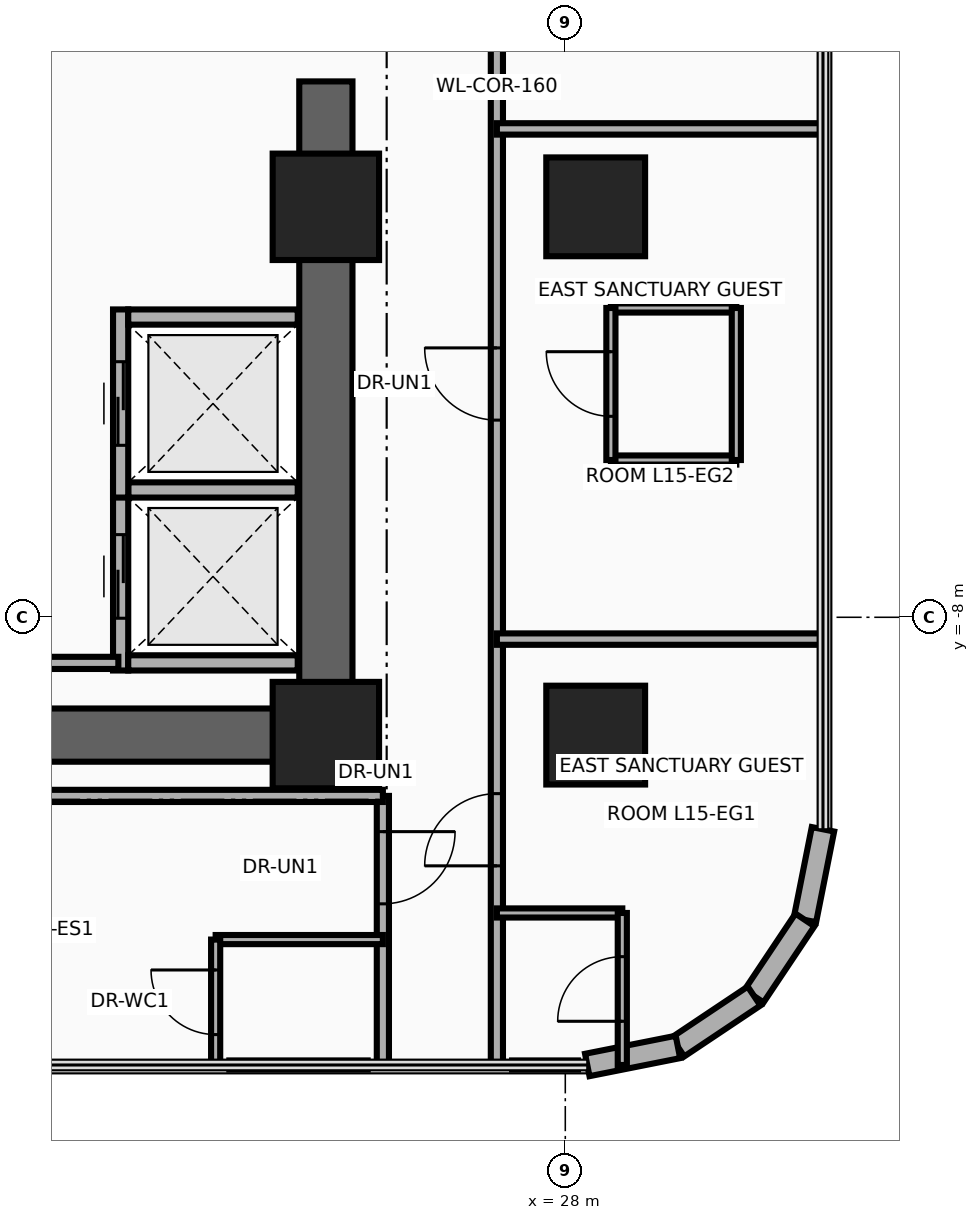
"""IFC4 building model, lengths in metres.
Left out: names, types, materials, properties, quantities, classifications, styles, units other than length and angle.
Written with IfcOpenShell. Run it as: python <this file> out.ifc"""

import sys

from ifc_helpers import new_model, si_unit, direction, frame, frame_2d, origin, origin_2d, place, context, subcontext, project, spatial, rectangle, circle, extrude, source, transform, mapped, element, fill, save


model = new_model("IFC4")
c1 = context("Model", 3, precision=1e-05, world=origin(), true_north=direction((0.0, 1.0)))
c2 = subcontext(c1, "Body", "Model", "MODEL_VIEW")
j1 = project(units=[si_unit("LENGTHUNIT", "METRE"), si_unit("PLANEANGLEUNIT", "RADIAN")], contexts=[c1])
p1 = place(None, origin())
s1 = spatial("IfcSite", under=j1, at=p1, CompositionType="ELEMENT")
p2 = place(p1, origin())
s2 = spatial("IfcBuilding", under=s1, at=p2, CompositionType="ELEMENT")
p3 = place(p2, frame((0.0, 0.0, 63.0)))
s3 = spatial("IfcBuildingStorey", under=s2, at=p3, CompositionType="ELEMENT", Elevation=63.0)
p4 = place(p3, frame((24.85, -9.9, 0.0), z_axis=(0.0, 0.0, 1.0), x_axis=(0.0, 1.0, 0.0)))
e1 = element("IfcWall", 1, at=p4, inside=s3, PredefinedType="SHEAR", context=c2, shape_type="SweptSolid", body=[
    extrude(rectangle(XDim=8.95, YDim=0.7, at=frame_2d((4.475, 0.0))), origin(), (0.0, 0.0, 1.0), 3.46),
])
p5 = place(p3, frame((15.85, -9.55, 0.0), z_axis=(0.0, 0.0, 1.0), x_axis=(1.0, 0.0, 0.0)))
e2 = element("IfcWall", 2, at=p5, inside=s3, PredefinedType="SHEAR", context=c2, shape_type="SweptSolid", body=[
    extrude(rectangle(XDim=9.0, YDim=0.7, at=frame_2d((4.5, 0.0))), origin(), (0.0, 0.0, 1.0), 3.46),
])
m1 = source(origin(), c2, "Body", "SweptSolid", [
    extrude(rectangle(XDim=1.4, YDim=1.4, at=origin_2d()), origin(), (0.0, 0.0, 1.0), 3.7),
])
p6 = place(p3, frame((24.85, -9.55, 0.0), z_axis=(0.0, 0.0, 1.0), x_axis=(1.0, 0.0, 0.0)))
e3 = element("IfcColumn", 3, at=p6, inside=s3, PredefinedType="COLUMN", context=c2, shape_type="MappedRepresentation", body=[
    mapped(m1, transform((0.0, 0.0, 0.0), x_axis=(1.0, 0.0, 0.0), y_axis=(0.0, 1.0, 0.0), z_axis=(0.0, 0.0, 1.0), scale=1.0)),
])
m2 = source(origin(), c2, "Body", "SweptSolid", [
    extrude(circle(Radius=0.65, at=origin_2d()), origin(), (0.0, 0.0, 1.0), 3.7),
])
p7 = place(p3, frame((28.4, -9.55, 0.0), z_axis=(0.0, 0.0, 1.0), x_axis=(1.0, 0.0, 0.0)))
e4 = element("IfcColumn", 4, at=p7, inside=s3, PredefinedType="COLUMN", context=c2, shape_type="MappedRepresentation", body=[
    mapped(m2, transform((0.0, 0.0, 0.0), x_axis=(1.0, 0.0, 0.0), y_axis=(0.0, 1.0, 0.0), z_axis=(0.0, 0.0, 1.0), scale=1.0)),
])
p8 = place(p3, frame((24.85, -2.6, 0.0), z_axis=(0.0, 0.0, 1.0), x_axis=(1.0, 0.0, 0.0)))
e5 = element("IfcColumn", 5, at=p8, inside=s3, PredefinedType="COLUMN", context=c2, shape_type="MappedRepresentation", body=[
    mapped(m1, transform((0.0, 0.0, 0.0), x_axis=(1.0, 0.0, 0.0), y_axis=(0.0, 1.0, 0.0), z_axis=(0.0, 0.0, 1.0), scale=1.0)),
])
p9 = place(p3, frame((28.4, -2.6, 0.0), z_axis=(0.0, 0.0, 1.0), x_axis=(1.0, 0.0, 0.0)))
e6 = element("IfcColumn", 6, at=p9, inside=s3, PredefinedType="COLUMN", context=c2, shape_type="MappedRepresentation", body=[
    mapped(m2, transform((0.0, 0.0, 0.0), x_axis=(1.0, 0.0, 0.0), y_axis=(0.0, 1.0, 0.0), z_axis=(0.0, 0.0, 1.0), scale=1.0)),
])
p10 = place(p3, frame((31.39, -10.789, 0.0), z_axis=(0.0, 0.0, 1.0), x_axis=(-0.194996050505, -0.980804027463, 0.0)))
e7 = element("IfcWall", 7, at=p10, inside=s3, PredefinedType="SOLIDWALL", context=c2, shape_type="SweptSolid", body=[
    extrude(rectangle(XDim=1.216, YDim=0.3, at=frame_2d((0.608, 0.0))), origin(), (0.0, 0.0, 1.0), 3.46),
])
for number, where, z_axis, x_axis in (
    (8, (31.153, -11.982, 0.0), (0.0, 0.0, 1.0), (-0.556, -0.831, 0.0)),
    (9, (30.483, -12.983, 0.0), (0.0, 0.0, 1.0), (-0.831, -0.556, 0.0)),
):
    element("IfcWall", number, at=place(p3, frame(where, z_axis=z_axis, x_axis=x_axis)), inside=s3, PredefinedType="SOLIDWALL", context=c2, shape_type="SweptSolid", body=[
        extrude(rectangle(XDim=1.205, YDim=0.3, at=frame_2d((0.603, 0.0))), origin(), (0.0, 0.0, 1.0), 3.46),
    ])
p11 = place(p3, frame((29.482, -13.653, 0.0), z_axis=(0.0, 0.0, 1.0), x_axis=(-0.980804027463, -0.194996050505, 0.0)))
e10 = element("IfcWall", 10, at=p11, inside=s3, PredefinedType="SOLIDWALL", context=c2, shape_type="SweptSolid", body=[
    extrude(rectangle(XDim=1.216, YDim=0.3, at=frame_2d((0.608, 0.0))), origin(), (0.0, 0.0, 1.0), 3.46),
])
p12 = place(p3, frame((22.15, -8.7, 0.0), z_axis=(0.0, 0.0, 1.0), x_axis=(0.0, 1.0, 0.0)))
e11 = element("IfcWall", 11, at=p12, inside=s3, PredefinedType="MOVABLE", context=c2, shape_type="SweptSolid", body=[
    extrude(rectangle(XDim=2.475, YDim=0.2, at=frame_2d((1.237, 0.0))), origin(), (0.0, 0.0, 1.0), 3.46),
])
p13 = place(p12, frame((0.688, 0.0, 0.0)))
e12 = element("IfcOpeningElement", 12, at=p13, cuts=e11, PredefinedType="OPENING", context=c2, shape_type="SweptSolid", body=[
    extrude(rectangle(XDim=1.1, YDim=2.1, at=frame_2d((0.55, 1.05))), frame((0.0, 0.115, 0.0), z_axis=(0.0, -1.0, 0.0), x_axis=(1.0, 0.0, 0.0)), (0.0, 0.0, 1.0), 0.23),
])
for number, where, z_axis, x_axis in (
    (13, (22.25, -8.6, 0.0), (0.0, 0.0, 1.0), (1.0, 0.0, 0.0)),
    (14, (22.25, -6.325, 0.0), (0.0, 0.0, 1.0), (1.0, 0.0, 0.0)),
):
    element("IfcWall", number, at=place(p3, frame(where, z_axis=z_axis, x_axis=x_axis)), inside=s3, PredefinedType="MOVABLE", context=c2, shape_type="SweptSolid", body=[
        extrude(rectangle(XDim=2.23, YDim=0.2, at=frame_2d((1.115, 0.0))), origin(), (0.0, 0.0, 1.0), 3.46),
    ])
p14 = place(p3, frame((22.15, -6.425, 0.0), z_axis=(0.0, 0.0, 1.0), x_axis=(0.0, 1.0, 0.0)))
e15 = element("IfcWall", 15, at=p14, inside=s3, PredefinedType="MOVABLE", context=c2, shape_type="SweptSolid", body=[
    extrude(rectangle(XDim=2.475, YDim=0.2, at=frame_2d((1.238, 0.0))), origin(), (0.0, 0.0, 1.0), 3.46),
])
p15 = place(p14, frame((0.688, 0.0, 0.0)))
e16 = element("IfcOpeningElement", 16, at=p15, cuts=e15, PredefinedType="OPENING", context=c2, shape_type="SweptSolid", body=[
    extrude(rectangle(XDim=1.1, YDim=2.1, at=frame_2d((0.55, 1.05))), frame((0.0, 0.115, 0.0), z_axis=(0.0, -1.0, 0.0), x_axis=(1.0, 0.0, 0.0)), (0.0, 0.0, 1.0), 0.23),
])
p16 = place(p3, frame((22.25, -4.05, 0.0), z_axis=(0.0, 0.0, 1.0), x_axis=(1.0, 0.0, 0.0)))
e17 = element("IfcWall", 17, at=p16, inside=s3, PredefinedType="MOVABLE", context=c2, shape_type="SweptSolid", body=[
    extrude(rectangle(XDim=2.23, YDim=0.2, at=frame_2d((1.115, 0.0))), origin(), (0.0, 0.0, 1.0), 3.46),
])
p17 = place(p3, frame((20.3, -8.6, 0.0), z_axis=(0.0, 0.0, 1.0), x_axis=(1.0, 0.0, 0.0)))
e18 = element("IfcWall", 18, at=p17, inside=s3, PredefinedType="PARTITIONING", context=c2, shape_type="SweptSolid", body=[
    extrude(rectangle(XDim=1.82, YDim=0.16, at=frame_2d((0.91, 0.0))), origin(), (0.0, 0.0, 1.0), 3.46),
])
p18 = place(p3, frame((25.6, -13.89, 0.0), z_axis=(0.0, 0.0, 1.0), x_axis=(0.0, 1.0, 0.0)))
e19 = element("IfcWall", 19, at=p18, inside=s3, PredefinedType="PARTITIONING", context=c2, shape_type="SweptSolid", body=[
    extrude(rectangle(XDim=3.54, YDim=0.16, at=frame_2d((1.77, 0.0))), origin(), (0.0, 0.0, 1.0), 3.46),
])
p19 = place(p18, frame((2.12, 0.0, 0.0)))
e20 = element("IfcOpeningElement", 20, at=p19, cuts=e19, PredefinedType="OPENING", context=c2, shape_type="SweptSolid", body=[
    extrude(rectangle(XDim=0.95, YDim=2.15, at=frame_2d((0.475, 1.075))), frame((0.0, 0.095, 0.0), z_axis=(0.0, -1.0, 0.0), x_axis=(1.0, 0.0, 0.0)), (0.0, 0.0, 1.0), 0.19),
])
p20 = place(p3, frame((13.41, -10.35, 0.0), z_axis=(0.0, 0.0, 1.0), x_axis=(1.0, 0.0, 0.0)))
e21 = element("IfcWall", 21, at=p20, inside=s3, PredefinedType="PARTITIONING", context=c2, shape_type="SweptSolid", body=[
    extrude(rectangle(XDim=12.19, YDim=0.16, at=frame_2d((6.095, 0.0))), origin(), (0.0, 0.0, 1.0), 3.46),
])
p21 = place(p3, frame((23.4, -12.24, 0.0), z_axis=(0.0, 0.0, 1.0), x_axis=(1.0, 0.0, 0.0)))
e22 = element("IfcWall", 22, at=p21, inside=s3, PredefinedType="PARTITIONING", context=c2, shape_type="SweptSolid", body=[
    extrude(rectangle(XDim=2.2, YDim=0.12, at=frame_2d((1.1, 0.0))), origin(), (0.0, 0.0, 1.0), 3.46),
])
p22 = place(p3, frame((23.4, -13.89, 0.0), z_axis=(0.0, 0.0, 1.0), x_axis=(0.0, 1.0, 0.0)))
e23 = element("IfcWall", 23, at=p22, inside=s3, PredefinedType="PARTITIONING", context=c2, shape_type="SweptSolid", body=[
    extrude(rectangle(XDim=1.65, YDim=0.12, at=frame_2d((0.825, 0.0))), origin(), (0.0, 0.0, 1.0), 3.46),
])
p23 = place(p22, frame((0.4, 0.0, 0.0)))
e24 = element("IfcOpeningElement", 24, at=p23, cuts=e23, PredefinedType="OPENING", context=c2, shape_type="SweptSolid", body=[
    extrude(rectangle(XDim=0.85, YDim=2.1, at=frame_2d((0.425, 1.05))), frame((0.0, 0.075, 0.0), z_axis=(0.0, -1.0, 0.0), x_axis=(1.0, 0.0, 0.0)), (0.0, 0.0, 1.0), 0.15),
])
p24 = place(p3, frame((23.58, -13.89, 0.0), z_axis=(0.0, 0.0, 1.0), x_axis=(1.0, 0.0, 0.0)))
e25 = element("IfcWall", 25, at=p24, inside=s3, PredefinedType="PARTITIONING", context=c2, shape_type="SweptSolid", body=[
    extrude(rectangle(XDim=1.82, YDim=0.12, at=frame_2d((0.91, 0.0))), origin(), (0.0, 0.0, 1.0), 3.46),
])
p25 = place(p3, frame((27.1, -13.89, 0.0), z_axis=(0.0, 0.0, 1.0), x_axis=(0.0, 1.0, 0.0)))
e26 = element("IfcWall", 26, at=p25, inside=s3, PredefinedType="PARTITIONING", context=c2, shape_type="SweptSolid", body=[
    extrude(rectangle(XDim=25.74, YDim=0.16, at=frame_2d((12.87, 0.0))), origin(), (0.0, 0.0, 1.0), 2.583),
])
p26 = place(p25, frame((2.62, 0.0, 0.0)))
e27 = element("IfcOpeningElement", 27, at=p26, cuts=e26, PredefinedType="OPENING", context=c2, shape_type="SweptSolid", body=[
    extrude(rectangle(XDim=0.95, YDim=2.15, at=frame_2d((0.475, 1.075))), frame((0.0, 0.095, 0.0), z_axis=(0.0, -1.0, 0.0), x_axis=(1.0, 0.0, 0.0)), (0.0, 0.0, 1.0), 0.19),
])
p27 = place(p25, frame((8.484, 0.0, 0.0)))
e28 = element("IfcOpeningElement", 28, at=p27, cuts=e26, PredefinedType="OPENING", context=c2, shape_type="SweptSolid", body=[
    extrude(rectangle(XDim=0.95, YDim=2.15, at=frame_2d((0.475, 1.075))), frame((0.0, 0.095, 0.0), z_axis=(0.0, -1.0, 0.0), x_axis=(1.0, 0.0, 0.0)), (0.0, 0.0, 1.0), 0.19),
])
p28 = place(p25, frame((14.197, 0.0, 0.0)))
e29 = element("IfcOpeningElement", 29, at=p28, cuts=e26, PredefinedType="OPENING", context=c2, shape_type="SweptSolid", body=[
    extrude(rectangle(XDim=0.95, YDim=2.15, at=frame_2d((0.475, 1.075))), frame((0.0, 0.095, 0.0), z_axis=(0.0, -1.0, 0.0), x_axis=(1.0, 0.0, 0.0)), (0.0, 0.0, 1.0), 0.19),
])
p29 = place(p25, frame((21.648, 0.0, 0.0)))
e30 = element("IfcOpeningElement", 30, at=p29, cuts=e26, PredefinedType="OPENING", context=c2, shape_type="SweptSolid", body=[
    extrude(rectangle(XDim=0.95, YDim=2.15, at=frame_2d((0.475, 1.075))), frame((0.0, 0.095, 0.0), z_axis=(0.0, -1.0, 0.0), x_axis=(1.0, 0.0, 0.0)), (0.0, 0.0, 1.0), 0.19),
])
for number, where, z_axis, x_axis in (
    (31, (27.1, -8.287, 0.0), (0.0, 0.0, 1.0), (1.0, 0.0, 0.0)),
    (32, (27.1, -1.575, 0.0), (0.0, 0.0, 1.0), (1.0, 0.0, 0.0)),
):
    element("IfcWall", number, at=place(p3, frame(where, z_axis=z_axis, x_axis=x_axis)), inside=s3, PredefinedType="PARTITIONING", context=c2, shape_type="SweptSolid", body=[
        extrude(rectangle(XDim=4.29, YDim=0.15, at=frame_2d((2.145, 0.0))), origin(), (0.0, 0.0, 1.0), 2.896),
    ])
p30 = place(p3, frame((27.1, -11.89, 0.0), z_axis=(0.0, 0.0, 1.0), x_axis=(1.0, 0.0, 0.0)))
e33 = element("IfcWall", 33, at=p30, inside=s3, PredefinedType="PARTITIONING", context=c2, shape_type="SweptSolid", body=[
    extrude(rectangle(XDim=1.65, YDim=0.12, at=frame_2d((0.825, 0.0))), origin(), (0.0, 0.0, 1.0), 3.46),
])
p31 = place(p3, frame((28.75, -13.89, 0.0), z_axis=(0.0, 0.0, 1.0), x_axis=(0.0, 1.0, 0.0)))
e34 = element("IfcWall", 34, at=p31, inside=s3, PredefinedType="PARTITIONING", context=c2, shape_type="SweptSolid", body=[
    extrude(rectangle(XDim=2.0, YDim=0.12, at=frame_2d((1.0, 0.0))), origin(), (0.0, 0.0, 1.0), 3.46),
])
p32 = place(p31, frame((0.575, 0.0, 0.0)))
e35 = element("IfcOpeningElement", 35, at=p32, cuts=e34, PredefinedType="OPENING", context=c2, shape_type="SweptSolid", body=[
    extrude(rectangle(XDim=0.85, YDim=2.1, at=frame_2d((0.425, 1.05))), frame((0.0, 0.075, 0.0), z_axis=(0.0, -1.0, 0.0), x_axis=(1.0, 0.0, 0.0)), (0.0, 0.0, 1.0), 0.15),
])
p33 = place(p3, frame((27.3, -13.89, 0.0), z_axis=(0.0, 0.0, 1.0), x_axis=(1.0, 0.0, 0.0)))
e36 = element("IfcWall", 36, at=p33, inside=s3, PredefinedType="PARTITIONING", context=c2, shape_type="SweptSolid", body=[
    extrude(rectangle(XDim=0.867, YDim=0.12, at=frame_2d((0.433, 0.0))), origin(), (0.0, 0.0, 1.0), 3.46),
])
for number, where, z_axis, x_axis in (
    (37, (28.6, -5.931, 0.0), (0.0, 0.0, 1.0), (1.0, 0.0, 0.0)),
    (38, (28.6, -3.931, 0.0), (0.0, 0.0, 1.0), (1.0, 0.0, 0.0)),
):
    element("IfcWall", number, at=place(p3, frame(where, z_axis=z_axis, x_axis=x_axis)), inside=s3, PredefinedType="PARTITIONING", context=c2, shape_type="SweptSolid", body=[
        extrude(rectangle(XDim=1.65, YDim=0.12, at=frame_2d((0.825, 0.0))), origin(), (0.0, 0.0, 1.0), 3.46),
    ])
p34 = place(p3, frame((30.25, -5.931, 0.0), z_axis=(0.0, 0.0, 1.0), x_axis=(0.0, 1.0, 0.0)))
e39 = element("IfcWall", 39, at=p34, inside=s3, PredefinedType="PARTITIONING", context=c2, shape_type="SweptSolid", body=[
    extrude(rectangle(XDim=2.0, YDim=0.12, at=frame_2d((1.0, 0.0))), origin(), (0.0, 0.0, 1.0), 3.46),
])
p35 = place(p3, frame((28.6, -5.931, 0.0), z_axis=(0.0, 0.0, 1.0), x_axis=(0.0, 1.0, 0.0)))
e40 = element("IfcWall", 40, at=p35, inside=s3, PredefinedType="PARTITIONING", context=c2, shape_type="SweptSolid", body=[
    extrude(rectangle(XDim=2.0, YDim=0.12, at=frame_2d((1.0, 0.0))), origin(), (0.0, 0.0, 1.0), 3.46),
])
p36 = place(p35, frame((0.575, 0.0, 0.0)))
e41 = element("IfcOpeningElement", 41, at=p36, cuts=e40, PredefinedType="OPENING", context=c2, shape_type="SweptSolid", body=[
    extrude(rectangle(XDim=0.85, YDim=2.1, at=frame_2d((0.425, 1.05))), frame((0.0, 0.075, 0.0), z_axis=(0.0, -1.0, 0.0), x_axis=(1.0, 0.0, 0.0)), (0.0, 0.0, 1.0), 0.15),
])
p37 = place(p13, origin())
e42 = element("IfcDoor", 42, at=p37, inside=s3, OperationType="DOUBLE_DOOR_SLIDING", PredefinedType="DOOR", context=c2, shape_type="SweptSolid", body=[
    extrude(rectangle(XDim=1.1, YDim=2.1, at=frame_2d((0.55, 1.05))), frame((0.0, 0.025, 0.0), z_axis=(0.0, -1.0, 0.0), x_axis=(1.0, 0.0, 0.0)), (0.0, 0.0, 1.0), 0.05),
])
fill(e12, e42)
p38 = place(p15, origin())
e43 = element("IfcDoor", 43, at=p38, inside=s3, OperationType="DOUBLE_DOOR_SLIDING", PredefinedType="DOOR", context=c2, shape_type="SweptSolid", body=[
    extrude(rectangle(XDim=1.1, YDim=2.1, at=frame_2d((0.55, 1.05))), frame((0.0, 0.025, 0.0), z_axis=(0.0, -1.0, 0.0), x_axis=(1.0, 0.0, 0.0)), (0.0, 0.0, 1.0), 0.05),
])
fill(e16, e43)
p39 = place(p19, frame((0.95, 0.0, 0.0), z_axis=(0.0, 0.0, 1.0), x_axis=(-1.0, 0.0, 0.0)))
e44 = element("IfcDoor", 44, at=p39, inside=s3, OperationType="SINGLE_SWING_LEFT", PredefinedType="DOOR", context=c2, shape_type="SweptSolid", body=[
    extrude(rectangle(XDim=0.95, YDim=2.15, at=frame_2d((0.475, 1.075))), frame((0.0, 0.025, 0.0), z_axis=(0.0, -1.0, 0.0), x_axis=(1.0, 0.0, 0.0)), (0.0, 0.0, 1.0), 0.05),
])
fill(e20, e44)
p40 = place(p23, origin())
e45 = element("IfcDoor", 45, at=p40, inside=s3, OperationType="SINGLE_SWING_RIGHT", PredefinedType="DOOR", context=c2, shape_type="SweptSolid", body=[
    extrude(rectangle(XDim=0.85, YDim=2.1, at=frame_2d((0.425, 1.05))), frame((0.0, 0.025, 0.0), z_axis=(0.0, -1.0, 0.0), x_axis=(1.0, 0.0, 0.0)), (0.0, 0.0, 1.0), 0.05),
])
fill(e24, e45)
p41 = place(p26, origin())
e46 = element("IfcDoor", 46, at=p41, inside=s3, OperationType="SINGLE_SWING_RIGHT", PredefinedType="DOOR", context=c2, shape_type="SweptSolid", body=[
    extrude(rectangle(XDim=0.95, YDim=2.15, at=frame_2d((0.475, 1.075))), frame((0.0, 0.025, 0.0), z_axis=(0.0, -1.0, 0.0), x_axis=(1.0, 0.0, 0.0)), (0.0, 0.0, 1.0), 0.05),
])
fill(e27, e46)
p42 = place(p32, origin())
e47 = element("IfcDoor", 47, at=p42, inside=s3, OperationType="SINGLE_SWING_LEFT", PredefinedType="DOOR", context=c2, shape_type="SweptSolid", body=[
    extrude(rectangle(XDim=0.85, YDim=2.1, at=frame_2d((0.425, 1.05))), frame((0.0, 0.025, 0.0), z_axis=(0.0, -1.0, 0.0), x_axis=(1.0, 0.0, 0.0)), (0.0, 0.0, 1.0), 0.05),
])
fill(e35, e47)
p43 = place(p27, origin())
e48 = element("IfcDoor", 48, at=p43, inside=s3, OperationType="SINGLE_SWING_RIGHT", PredefinedType="DOOR", context=c2, shape_type="SweptSolid", body=[
    extrude(rectangle(XDim=0.95, YDim=2.15, at=frame_2d((0.475, 1.075))), frame((0.0, 0.025, 0.0), z_axis=(0.0, -1.0, 0.0), x_axis=(1.0, 0.0, 0.0)), (0.0, 0.0, 1.0), 0.05),
])
fill(e28, e48)
p44 = place(p36, origin())
e49 = element("IfcDoor", 49, at=p44, inside=s3, OperationType="SINGLE_SWING_LEFT", PredefinedType="DOOR", context=c2, shape_type="SweptSolid", body=[
    extrude(rectangle(XDim=0.85, YDim=2.1, at=frame_2d((0.425, 1.05))), frame((0.0, 0.025, 0.0), z_axis=(0.0, -1.0, 0.0), x_axis=(1.0, 0.0, 0.0)), (0.0, 0.0, 1.0), 0.05),
])
fill(e41, e49)
save(model, sys.argv[1])
